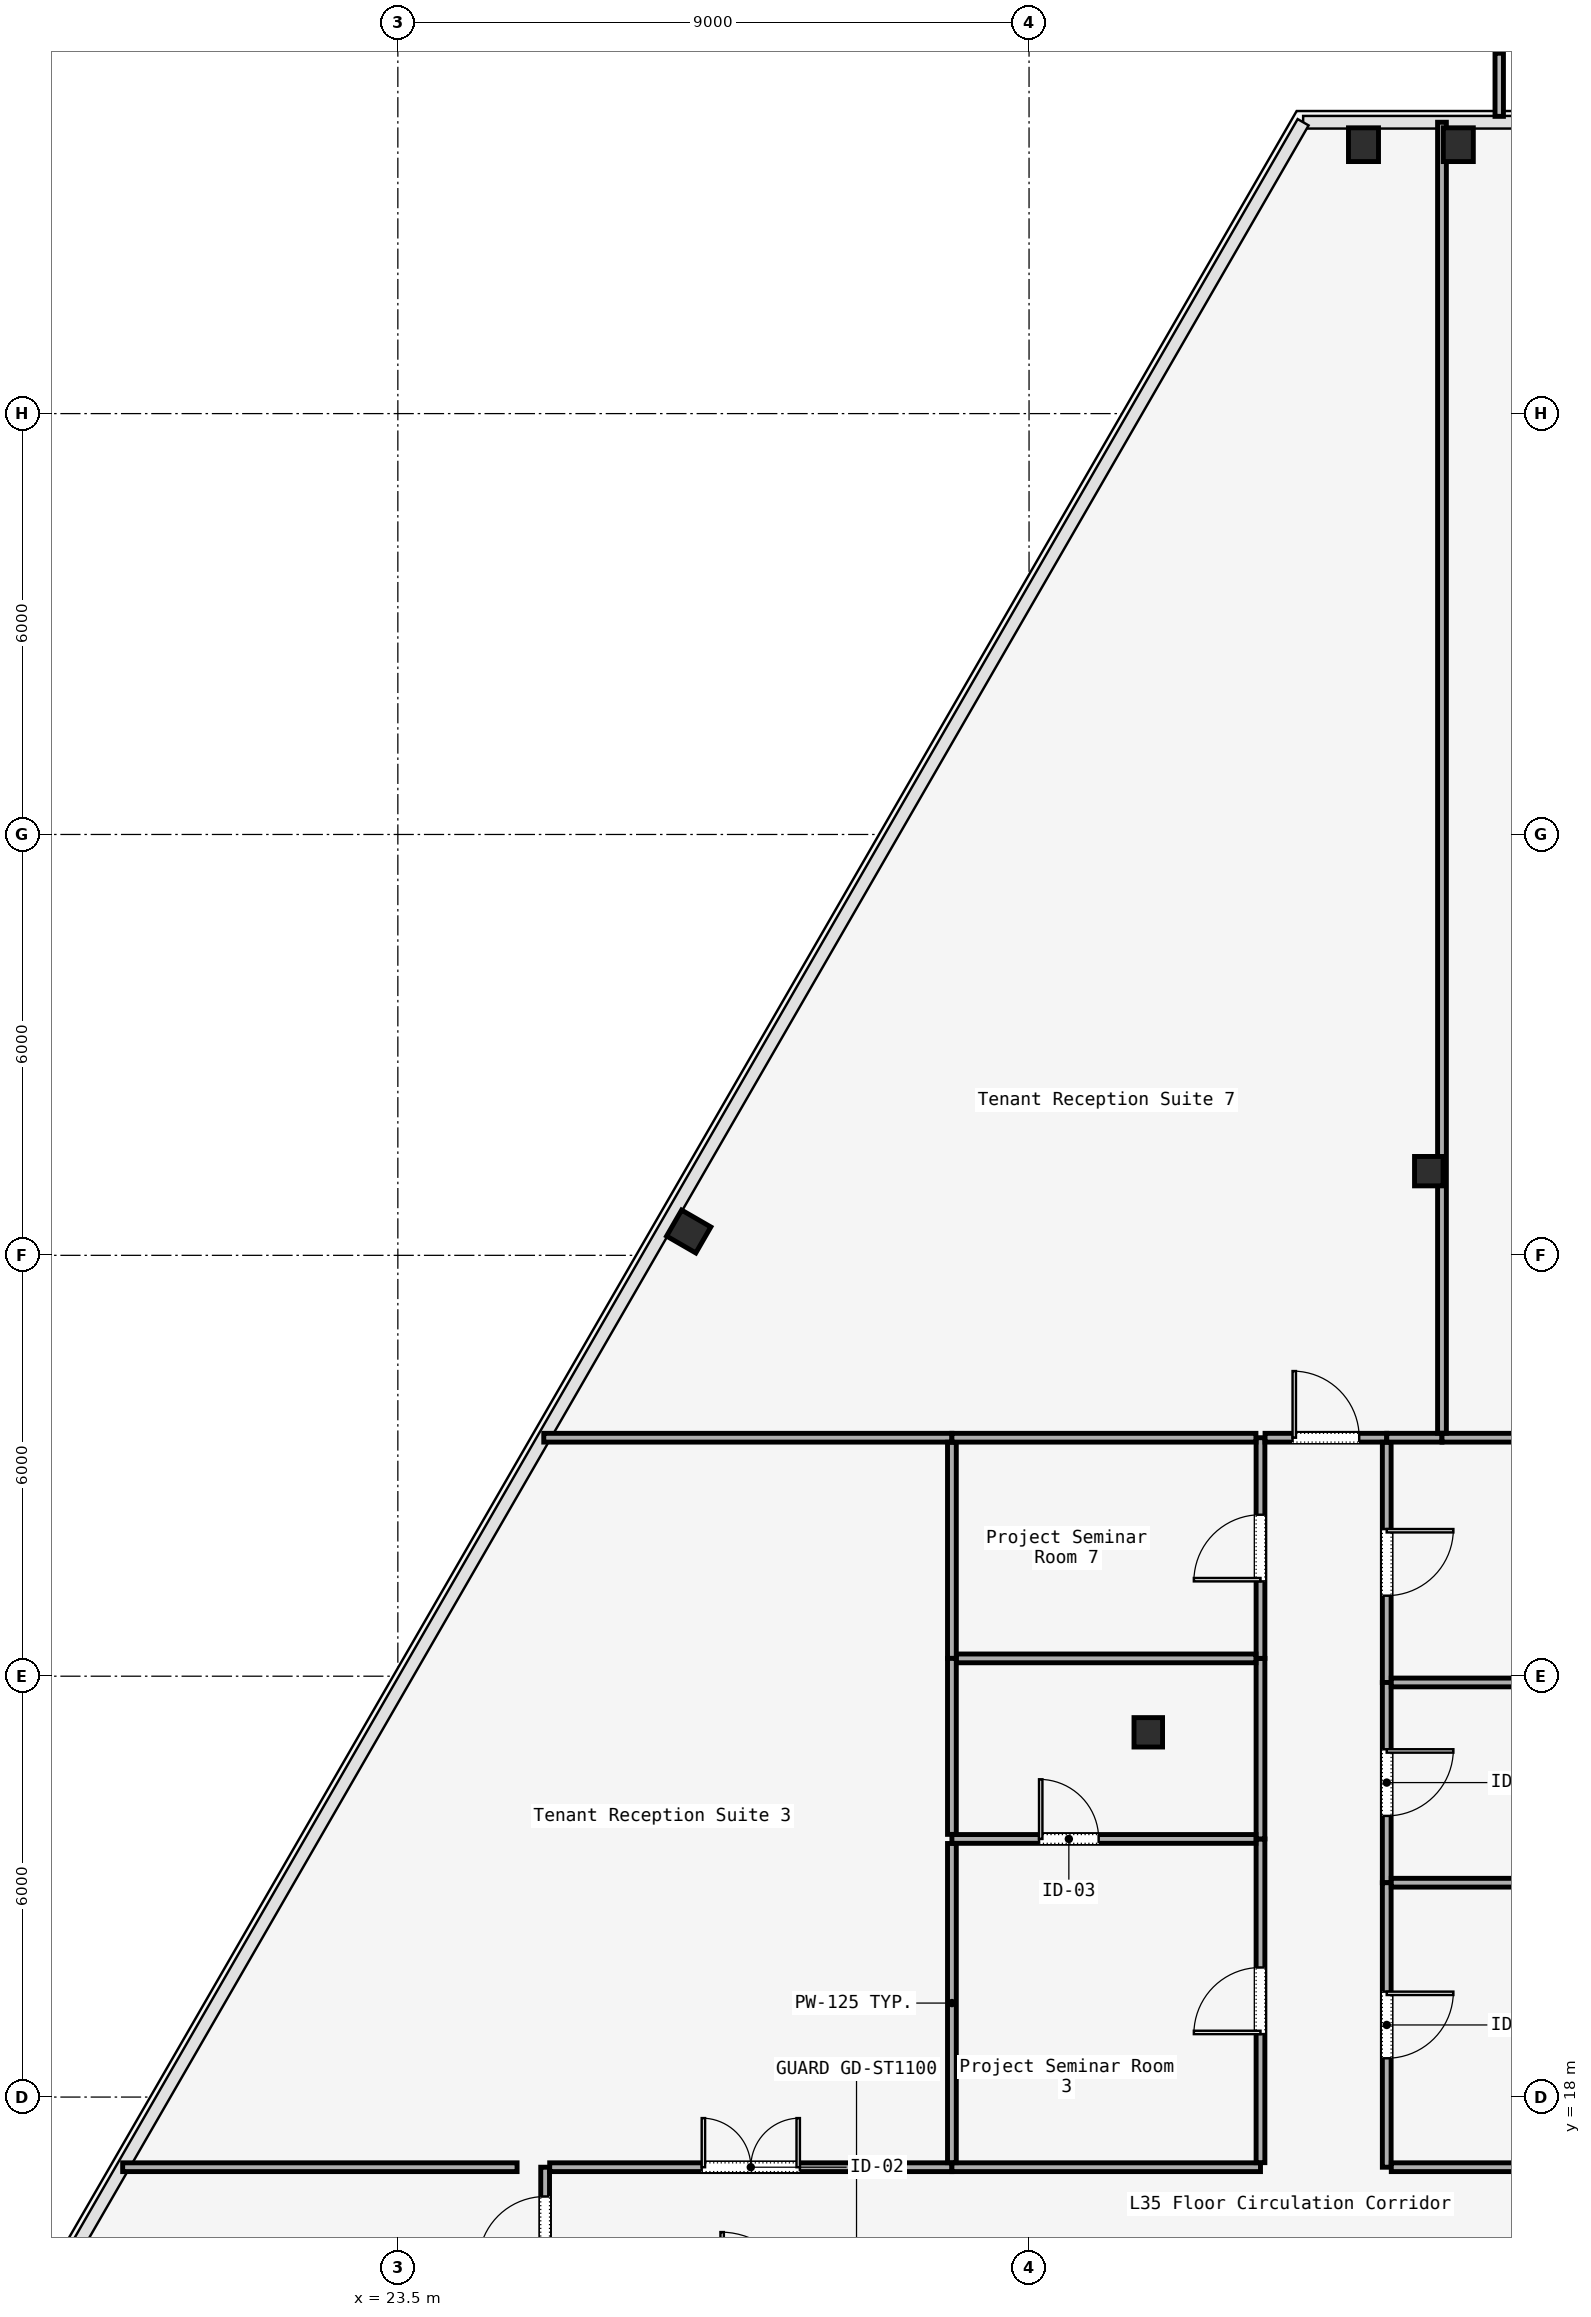
"""IFC4 building model, lengths in metres.
Left out: names, types, materials, properties, quantities, classifications, styles, units other than length and angle.
Written with IfcOpenShell. Run it as: python <this file> out.ifc"""

import sys

from ifc_helpers import new_model, si_unit, direction, frame, frame_2d, origin, origin_2d, place, context, subcontext, project, spatial, rectangle, i_section, extrude, element, fill, save


model = new_model("IFC4")
c1 = context("Model", 3, precision=1e-05, world=origin(), true_north=direction((0.0, 1.0)))
c2 = subcontext(c1, "Body", "Model", "MODEL_VIEW")
j1 = project(units=[si_unit("LENGTHUNIT", "METRE"), si_unit("PLANEANGLEUNIT", "RADIAN")], contexts=[c1])
p1 = place(None, origin())
s1 = spatial("IfcSite", under=j1, at=p1, CompositionType="ELEMENT")
p2 = place(p1, origin())
s2 = spatial("IfcBuilding", under=s1, at=p2, CompositionType="ELEMENT")
p3 = place(p2, frame((0.0, 0.0, 149.8)))
s3 = spatial("IfcBuildingStorey", under=s2, at=p3, CompositionType="ELEMENT", Elevation=149.8)
for number, where, z_axis, x_axis in (
    (1, (34.2, 23.2, 0.0), (0.0, 0.0, 1.0), (1.0, 0.0, 0.0)),
    (2, (38.2, 31.2, 0.0), (0.0, 0.0, 1.0), (1.0, 0.0, 0.0)),
):
    element("IfcColumn", number, at=place(p3, frame(where, z_axis=z_axis, x_axis=x_axis)), inside=s3, PredefinedType="COLUMN", context=c2, shape_type="SweptSolid", body=[
        extrude(i_section(OverallWidth=0.407, OverallDepth=0.419, WebThickness=0.031, FlangeThickness=0.049, FilletRadius=0.015, at=origin_2d()), origin(), (0.0, 0.0, 1.0), 3.58),
    ])
for number, where, z_axis, x_axis in (
    (3, (38.621, 45.834, 0.0), (0.0, 0.0, 1.0), (1.0, 0.0, 0.0)),
    (4, (37.269, 45.834, 0.0), (0.0, 0.0, 1.0), (1.0, 0.0, 0.0)),
    (5, (27.647, 30.34, 0.0), (0.0, 0.0, 1.0), (0.5, 0.866, 0.0)),
):
    element("IfcColumn", number, at=place(p3, frame(where, z_axis=z_axis, x_axis=x_axis)), inside=s3, PredefinedType="COLUMN", context=c2, shape_type="SweptSolid", body=[
        extrude(i_section(OverallWidth=0.428, OverallDepth=0.481, WebThickness=0.051, FlangeThickness=0.065, FilletRadius=0.015, at=origin_2d()), origin(), (0.0, 0.0, 1.0), 3.58),
    ])
p4 = place(p3, frame((25.6, 15.215, 0.0), z_axis=(0.0, 0.0, 1.0), x_axis=(0.0, 1.0, 0.0)))
e6 = element("IfcWall", 6, at=p4, inside=s3, PredefinedType="PARTITIONING", context=c2, shape_type="SweptSolid", body=[
    extrude(rectangle(XDim=1.785, YDim=0.125, at=frame_2d((0.893, 0.0))), origin(), (0.0, 0.0, 1.0), 3.01),
])
p5 = place(p4, frame((0.417, 0.0, 0.0)))
e7 = element("IfcOpeningElement", 7, at=p5, cuts=e6, PredefinedType="OPENING", context=c2, shape_type="SweptSolid", body=[
    extrude(rectangle(XDim=0.95, YDim=2.2, at=frame_2d((0.475, 1.1))), frame((0.0, 0.062, 0.0), z_axis=(0.0, -1.0, 0.0), x_axis=(1.0, 0.0, 0.0)), (0.0, 0.0, 1.0), 0.125),
])
p6 = place(p3, frame((25.665, 17.0, 0.0), z_axis=(0.0, 0.0, 1.0), x_axis=(1.0, 0.0, 0.0)))
e8 = element("IfcWall", 8, at=p6, inside=s3, PredefinedType="PARTITIONING", context=c2, shape_type="SweptSolid", body=[
    extrude(rectangle(XDim=5.735, YDim=0.125, at=frame_2d((2.867, 0.0))), origin(), (0.0, 0.0, 1.0), 3.01),
])
p7 = place(p6, frame((2.167, 0.0, 0.0)))
e9 = element("IfcOpeningElement", 9, at=p7, cuts=e8, PredefinedType="OPENING", context=c2, shape_type="SweptSolid", body=[
    extrude(rectangle(XDim=1.4, YDim=2.2, at=frame_2d((0.7, 1.1))), frame((0.0, 0.062, 0.0), z_axis=(0.0, -1.0, 0.0), x_axis=(1.0, 0.0, 0.0)), (0.0, 0.0, 1.0), 0.125),
])
p8 = place(p3, frame((31.4, 17.0, 0.0), z_axis=(0.0, 0.0, 1.0), x_axis=(1.0, 0.0, 0.0)))
e10 = element("IfcWall", 10, at=p8, inside=s3, PredefinedType="PARTITIONING", context=c2, shape_type="SweptSolid", body=[
    extrude(rectangle(XDim=4.4, YDim=0.125, at=frame_2d((2.2, 0.0))), origin(), (0.0, 0.0, 1.0), 3.01),
])
p9 = place(p3, frame((35.8, 17.065, 0.0), z_axis=(0.0, 0.0, 1.0), x_axis=(0.0, 1.0, 0.0)))
e11 = element("IfcWall", 11, at=p9, inside=s3, PredefinedType="PARTITIONING", context=c2, shape_type="SweptSolid", body=[
    extrude(rectangle(XDim=4.615, YDim=0.125, at=frame_2d((2.308, 0.0))), origin(), (0.0, 0.0, 1.0), 3.01),
])
p10 = place(p9, frame((1.833, 0.0, 0.0)))
e12 = element("IfcOpeningElement", 12, at=p10, cuts=e11, PredefinedType="OPENING", context=c2, shape_type="SweptSolid", body=[
    extrude(rectangle(XDim=0.95, YDim=2.2, at=frame_2d((0.475, 1.1))), frame((0.0, 0.062, 0.0), z_axis=(0.0, -1.0, 0.0), x_axis=(1.0, 0.0, 0.0)), (0.0, 0.0, 1.0), 0.125),
])
p11 = place(p3, frame((35.8, 21.68, 0.0), z_axis=(0.0, 0.0, 1.0), x_axis=(0.0, 1.0, 0.0)))
e13 = element("IfcWall", 13, at=p11, inside=s3, PredefinedType="PARTITIONING", context=c2, shape_type="SweptSolid", body=[
    extrude(rectangle(XDim=2.574, YDim=0.125, at=frame_2d((1.287, 0.0))), origin(), (0.0, 0.0, 1.0), 3.01),
])
p12 = place(p3, frame((35.8, 24.254, 0.0), z_axis=(0.0, 0.0, 1.0), x_axis=(0.0, 1.0, 0.0)))
e14 = element("IfcWall", 14, at=p12, inside=s3, PredefinedType="PARTITIONING", context=c2, shape_type="SweptSolid", body=[
    extrude(rectangle(XDim=3.146, YDim=0.125, at=frame_2d((1.573, 0.0))), origin(), (0.0, 0.0, 1.0), 3.01),
])
p13 = place(p12, frame((1.098, 0.0, 0.0)))
e15 = element("IfcOpeningElement", 15, at=p13, cuts=e14, PredefinedType="OPENING", context=c2, shape_type="SweptSolid", body=[
    extrude(rectangle(XDim=0.95, YDim=2.2, at=frame_2d((0.475, 1.1))), frame((0.0, 0.062, 0.0), z_axis=(0.0, -1.0, 0.0), x_axis=(1.0, 0.0, 0.0)), (0.0, 0.0, 1.0), 0.125),
])
p14 = place(p3, frame((35.865, 27.4, 0.0), z_axis=(0.0, 0.0, 1.0), x_axis=(1.0, 0.0, 0.0)))
e16 = element("IfcWall", 16, at=p14, inside=s3, PredefinedType="PARTITIONING", context=c2, shape_type="SweptSolid", body=[
    extrude(rectangle(XDim=1.735, YDim=0.125, at=frame_2d((0.868, 0.0))), origin(), (0.0, 0.0, 1.0), 3.01),
])
p15 = place(p14, frame((0.393, 0.0, 0.0)))
e17 = element("IfcOpeningElement", 17, at=p15, cuts=e16, PredefinedType="OPENING", context=c2, shape_type="SweptSolid", body=[
    extrude(rectangle(XDim=0.95, YDim=2.2, at=frame_2d((0.475, 1.1))), frame((0.0, 0.062, 0.0), z_axis=(0.0, -1.0, 0.0), x_axis=(1.0, 0.0, 0.0)), (0.0, 0.0, 1.0), 0.125),
])
p16 = place(p3, frame((37.6, 27.335, 0.0), z_axis=(0.0, 0.0, 1.0), x_axis=(0.0, -1.0, 0.0)))
e18 = element("IfcWall", 18, at=p16, inside=s3, PredefinedType="PARTITIONING", context=c2, shape_type="SweptSolid", body=[
    extrude(rectangle(XDim=3.424, YDim=0.125, at=frame_2d((1.712, 0.0))), origin(), (0.0, 0.0, 1.0), 3.01),
])
p17 = place(p16, frame((1.237, 0.0, 0.0)))
e19 = element("IfcOpeningElement", 19, at=p17, cuts=e18, PredefinedType="OPENING", context=c2, shape_type="SweptSolid", body=[
    extrude(rectangle(XDim=0.95, YDim=2.2, at=frame_2d((0.475, 1.1))), frame((0.0, 0.062, 0.0), z_axis=(0.0, -1.0, 0.0), x_axis=(1.0, 0.0, 0.0)), (0.0, 0.0, 1.0), 0.125),
])
p18 = place(p3, frame((37.6, 23.911, 0.0), z_axis=(0.0, 0.0, 1.0), x_axis=(0.0, -1.0, 0.0)))
e20 = element("IfcWall", 20, at=p18, inside=s3, PredefinedType="PARTITIONING", context=c2, shape_type="SweptSolid", body=[
    extrude(rectangle(XDim=2.855, YDim=0.125, at=frame_2d((1.427, 0.0))), origin(), (0.0, 0.0, 1.0), 3.01),
])
p19 = place(p18, frame((0.952, 0.0, 0.0)))
e21 = element("IfcOpeningElement", 21, at=p19, cuts=e20, PredefinedType="OPENING", context=c2, shape_type="SweptSolid", body=[
    extrude(rectangle(XDim=0.95, YDim=2.2, at=frame_2d((0.475, 1.1))), frame((0.0, 0.062, 0.0), z_axis=(0.0, -1.0, 0.0), x_axis=(1.0, 0.0, 0.0)), (0.0, 0.0, 1.0), 0.125),
])
p20 = place(p3, frame((37.6, 21.056, 0.0), z_axis=(0.0, 0.0, 1.0), x_axis=(0.0, -1.0, 0.0)))
e22 = element("IfcWall", 22, at=p20, inside=s3, PredefinedType="PARTITIONING", context=c2, shape_type="SweptSolid", body=[
    extrude(rectangle(XDim=4.056, YDim=0.125, at=frame_2d((2.028, 0.0))), origin(), (0.0, 0.0, 1.0), 3.01),
])
p21 = place(p20, frame((1.553, 0.0, 0.0)))
e23 = element("IfcOpeningElement", 23, at=p21, cuts=e22, PredefinedType="OPENING", context=c2, shape_type="SweptSolid", body=[
    extrude(rectangle(XDim=0.95, YDim=2.2, at=frame_2d((0.475, 1.1))), frame((0.0, 0.062, 0.0), z_axis=(0.0, -1.0, 0.0), x_axis=(1.0, 0.0, 0.0)), (0.0, 0.0, 1.0), 0.125),
])
p22 = place(p3, frame((37.665, 17.0, 0.0), z_axis=(0.0, 0.0, 1.0), x_axis=(1.0, 0.0, 0.0)))
e24 = element("IfcWall", 24, at=p22, inside=s3, PredefinedType="PARTITIONING", context=c2, shape_type="SweptSolid", body=[
    extrude(rectangle(XDim=3.445, YDim=0.125, at=frame_2d((1.723, 0.0))), origin(), (0.0, 0.0, 1.0), 3.01),
])
p23 = place(p3, frame((19.576, 17.0, 0.0), z_axis=(0.0, 0.0, 1.0), x_axis=(1.0, 0.0, 0.0)))
e25 = element("IfcWall", 25, at=p23, inside=s3, PredefinedType="PARTITIONING", context=c2, shape_type="SweptSolid", body=[
    extrude(rectangle(XDim=5.624, YDim=0.125, at=frame_2d((2.812, 0.0))), origin(), (0.0, 0.0, 1.0), 3.01),
])
p24 = place(p3, frame((37.665, 21.056, 0.0), z_axis=(0.0, 0.0, 1.0), x_axis=(1.0, 0.0, 0.0)))
e26 = element("IfcWall", 26, at=p24, inside=s3, PredefinedType="PARTITIONING", context=c2, shape_type="SweptSolid", body=[
    extrude(rectangle(XDim=3.38, YDim=0.125, at=frame_2d((1.69, 0.0))), origin(), (0.0, 0.0, 1.0), 3.01),
])
p25 = place(p3, frame((31.4, 21.68, 0.0), z_axis=(0.0, 0.0, 1.0), x_axis=(1.0, 0.0, 0.0)))
e27 = element("IfcWall", 27, at=p25, inside=s3, PredefinedType="PARTITIONING", context=c2, shape_type="SweptSolid", body=[
    extrude(rectangle(XDim=4.335, YDim=0.125, at=frame_2d((2.167, 0.0))), origin(), (0.0, 0.0, 1.0), 3.01),
])
p26 = place(p25, frame((1.242, 0.0, 0.0)))
e28 = element("IfcOpeningElement", 28, at=p26, cuts=e27, PredefinedType="OPENING", context=c2, shape_type="SweptSolid", body=[
    extrude(rectangle(XDim=0.85, YDim=2.15, at=frame_2d((0.425, 1.075))), frame((0.0, 0.062, 0.0), z_axis=(0.0, -1.0, 0.0), x_axis=(1.0, 0.0, 0.0)), (0.0, 0.0, 1.0), 0.125),
])
p27 = place(p3, frame((31.4, 17.065, 0.0), z_axis=(0.0, 0.0, 1.0), x_axis=(0.0, 1.0, 0.0)))
e29 = element("IfcWall", 29, at=p27, inside=s3, PredefinedType="PARTITIONING", context=c2, shape_type="SweptSolid", body=[
    extrude(rectangle(XDim=4.55, YDim=0.125, at=frame_2d((2.275, 0.0))), origin(), (0.0, 0.0, 1.0), 3.01),
])
p28 = place(p3, frame((25.581, 27.4, 0.0), z_axis=(0.0, 0.0, 1.0), x_axis=(1.0, 0.0, 0.0)))
e30 = element("IfcWall", 30, at=p28, inside=s3, PredefinedType="PARTITIONING", context=c2, shape_type="SweptSolid", body=[
    extrude(rectangle(XDim=5.819, YDim=0.125, at=frame_2d((2.91, 0.0))), origin(), (0.0, 0.0, 1.0), 3.01),
])
p29 = place(p3, frame((31.4, 27.335, 0.0), z_axis=(0.0, 0.0, 1.0), x_axis=(0.0, -1.0, 0.0)))
e31 = element("IfcWall", 31, at=p29, inside=s3, PredefinedType="PARTITIONING", context=c2, shape_type="SweptSolid", body=[
    extrude(rectangle(XDim=3.081, YDim=0.125, at=frame_2d((1.541, 0.0))), origin(), (0.0, 0.0, 1.0), 3.01),
])
p30 = place(p3, frame((31.4, 24.254, 0.0), z_axis=(0.0, 0.0, 1.0), x_axis=(0.0, -1.0, 0.0)))
e32 = element("IfcWall", 32, at=p30, inside=s3, PredefinedType="PARTITIONING", context=c2, shape_type="SweptSolid", body=[
    extrude(rectangle(XDim=2.509, YDim=0.125, at=frame_2d((1.254, 0.0))), origin(), (0.0, 0.0, 1.0), 3.01),
])
p31 = place(p3, frame((37.665, 23.911, 0.0), z_axis=(0.0, 0.0, 1.0), x_axis=(1.0, 0.0, 0.0)))
e33 = element("IfcWall", 33, at=p31, inside=s3, PredefinedType="PARTITIONING", context=c2, shape_type="SweptSolid", body=[
    extrude(rectangle(XDim=3.985, YDim=0.125, at=frame_2d((1.992, 0.0))), origin(), (0.0, 0.0, 1.0), 3.01),
])
p32 = place(p3, frame((31.465, 24.254, 0.0), z_axis=(0.0, 0.0, 1.0), x_axis=(1.0, 0.0, 0.0)))
e34 = element("IfcWall", 34, at=p32, inside=s3, PredefinedType="PARTITIONING", context=c2, shape_type="SweptSolid", body=[
    extrude(rectangle(XDim=4.27, YDim=0.125, at=frame_2d((2.135, 0.0))), origin(), (0.0, 0.0, 1.0), 3.01),
])
p33 = place(p3, frame((37.6, 27.4, 0.0), z_axis=(0.0, 0.0, 1.0), x_axis=(1.0, 0.0, 0.0)))
e35 = element("IfcWall", 35, at=p33, inside=s3, PredefinedType="PARTITIONING", context=c2, shape_type="SweptSolid", body=[
    extrude(rectangle(XDim=0.788, YDim=0.125, at=frame_2d((0.394, 0.0))), origin(), (0.0, 0.0, 1.0), 3.01),
])
p34 = place(p3, frame((38.388, 27.4, 0.0), z_axis=(0.0, 0.0, 1.0), x_axis=(1.0, 0.0, 0.0)))
e36 = element("IfcWall", 36, at=p34, inside=s3, PredefinedType="PARTITIONING", context=c2, shape_type="SweptSolid", body=[
    extrude(rectangle(XDim=3.197, YDim=0.125, at=frame_2d((1.599, 0.0))), origin(), (0.0, 0.0, 1.0), 3.01),
])
p35 = place(p3, frame((31.4, 27.4, 0.0), z_axis=(0.0, 0.0, 1.0), x_axis=(1.0, 0.0, 0.0)))
e37 = element("IfcWall", 37, at=p35, inside=s3, PredefinedType="PARTITIONING", context=c2, shape_type="SweptSolid", body=[
    extrude(rectangle(XDim=4.335, YDim=0.125, at=frame_2d((2.167, 0.0))), origin(), (0.0, 0.0, 1.0), 3.01),
])
p36 = place(p3, frame((38.388, 46.154, 0.0), z_axis=(0.0, 0.0, 1.0), x_axis=(0.0, -1.0, 0.0)))
e38 = element("IfcWall", 38, at=p36, inside=s3, PredefinedType="PARTITIONING", context=c2, shape_type="SweptSolid", body=[
    extrude(rectangle(XDim=18.689, YDim=0.125, at=frame_2d((9.344, 0.0))), origin(), (0.0, 0.0, 1.0), 3.01),
])
p37 = place(p5, origin())
e39 = element("IfcDoor", 39, at=p37, inside=s3, OperationType="SINGLE_SWING_RIGHT", PredefinedType="DOOR", context=c2, shape_type="SweptSolid", body=[
    extrude(rectangle(XDim=0.95, YDim=2.2, at=frame_2d((0.475, 1.1))), frame((0.0, 0.025, 0.0), z_axis=(0.0, -1.0, 0.0), x_axis=(1.0, 0.0, 0.0)), (0.0, 0.0, 1.0), 0.05),
])
fill(e7, e39)
p38 = place(p21, origin())
e40 = element("IfcDoor", 40, at=p38, inside=s3, OperationType="SINGLE_SWING_RIGHT", PredefinedType="DOOR", context=c2, shape_type="SweptSolid", body=[
    extrude(rectangle(XDim=0.95, YDim=2.2, at=frame_2d((0.475, 1.1))), frame((0.0, 0.025, 0.0), z_axis=(0.0, -1.0, 0.0), x_axis=(1.0, 0.0, 0.0)), (0.0, 0.0, 1.0), 0.05),
])
fill(e23, e40)
p39 = place(p10, origin())
e41 = element("IfcDoor", 41, at=p39, inside=s3, OperationType="SINGLE_SWING_RIGHT", PredefinedType="DOOR", context=c2, shape_type="SweptSolid", body=[
    extrude(rectangle(XDim=0.95, YDim=2.2, at=frame_2d((0.475, 1.1))), frame((0.0, 0.025, 0.0), z_axis=(0.0, -1.0, 0.0), x_axis=(1.0, 0.0, 0.0)), (0.0, 0.0, 1.0), 0.05),
])
fill(e12, e41)
p40 = place(p7, origin())
e42 = element("IfcDoor", 42, at=p40, inside=s3, OperationType="SINGLE_SWING_RIGHT", PredefinedType="DOOR", context=c2, shape_type="SweptSolid", body=[
    extrude(rectangle(XDim=1.4, YDim=2.2, at=frame_2d((0.7, 1.1))), frame((0.0, 0.025, 0.0), z_axis=(0.0, -1.0, 0.0), x_axis=(1.0, 0.0, 0.0)), (0.0, 0.0, 1.0), 0.05),
])
fill(e9, e42)
p41 = place(p19, origin())
e43 = element("IfcDoor", 43, at=p41, inside=s3, OperationType="SINGLE_SWING_RIGHT", PredefinedType="DOOR", context=c2, shape_type="SweptSolid", body=[
    extrude(rectangle(XDim=0.95, YDim=2.2, at=frame_2d((0.475, 1.1))), frame((0.0, 0.025, 0.0), z_axis=(0.0, -1.0, 0.0), x_axis=(1.0, 0.0, 0.0)), (0.0, 0.0, 1.0), 0.05),
])
fill(e21, e43)
p42 = place(p26, origin())
e44 = element("IfcDoor", 44, at=p42, inside=s3, OperationType="SINGLE_SWING_LEFT", PredefinedType="DOOR", context=c2, shape_type="SweptSolid", body=[
    extrude(rectangle(XDim=0.85, YDim=2.15, at=frame_2d((0.425, 1.075))), frame((0.0, 0.025, 0.0), z_axis=(0.0, -1.0, 0.0), x_axis=(1.0, 0.0, 0.0)), (0.0, 0.0, 1.0), 0.05),
])
fill(e28, e44)
p43 = place(p17, origin())
e45 = element("IfcDoor", 45, at=p43, inside=s3, OperationType="SINGLE_SWING_LEFT", PredefinedType="DOOR", context=c2, shape_type="SweptSolid", body=[
    extrude(rectangle(XDim=0.95, YDim=2.2, at=frame_2d((0.475, 1.1))), frame((0.0, 0.025, 0.0), z_axis=(0.0, -1.0, 0.0), x_axis=(1.0, 0.0, 0.0)), (0.0, 0.0, 1.0), 0.05),
])
fill(e19, e45)
p44 = place(p13, origin())
e46 = element("IfcDoor", 46, at=p44, inside=s3, OperationType="SINGLE_SWING_RIGHT", PredefinedType="DOOR", context=c2, shape_type="SweptSolid", body=[
    extrude(rectangle(XDim=0.95, YDim=2.2, at=frame_2d((0.475, 1.1))), frame((0.0, 0.025, 0.0), z_axis=(0.0, -1.0, 0.0), x_axis=(1.0, 0.0, 0.0)), (0.0, 0.0, 1.0), 0.05),
])
fill(e15, e46)
p45 = place(p15, origin())
e47 = element("IfcDoor", 47, at=p45, inside=s3, OperationType="SINGLE_SWING_LEFT", PredefinedType="DOOR", context=c2, shape_type="SweptSolid", body=[
    extrude(rectangle(XDim=0.95, YDim=2.2, at=frame_2d((0.475, 1.1))), frame((0.0, 0.025, 0.0), z_axis=(0.0, -1.0, 0.0), x_axis=(1.0, 0.0, 0.0)), (0.0, 0.0, 1.0), 0.05),
])
fill(e17, e47)
save(model, sys.argv[1])
